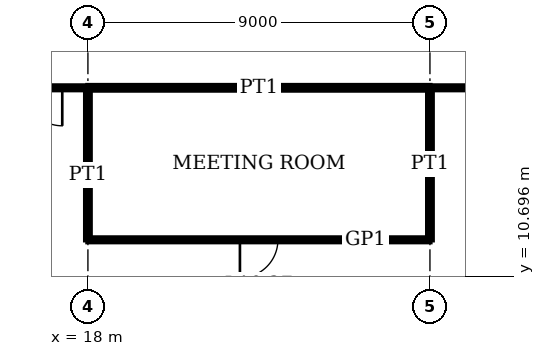
"""IFC4 building model, lengths in metres.
Left out: names, types, materials, properties, quantities, classifications, styles, units other than length and angle.
Written with IfcOpenShell. Run it as: python <this file> out.ifc"""

import sys

from ifc_helpers import new_model, si_unit, direction, frame, frame_2d, origin, place, context, subcontext, project, spatial, rectangle, extrude, element, fill, save


model = new_model("IFC4")
c1 = context("Model", 3, precision=1e-05, world=origin(), true_north=direction((0.0, 1.0)))
c2 = subcontext(c1, "Body", "Model", "MODEL_VIEW")
j1 = project(units=[si_unit("LENGTHUNIT", "METRE"), si_unit("PLANEANGLEUNIT", "RADIAN")], contexts=[c1])
p1 = place(None, origin())
s1 = spatial("IfcSite", under=j1, at=p1, CompositionType="ELEMENT")
p2 = place(p1, origin())
s2 = spatial("IfcBuilding", under=s1, at=p2, CompositionType="ELEMENT")
p3 = place(p2, frame((0.0, 0.0, 43.8)))
s3 = spatial("IfcBuildingStorey", under=s2, at=p3, CompositionType="ELEMENT", Elevation=43.8)
p4 = place(p3, frame((18.0, 11.65, 0.0), z_axis=(0.0, 0.0, 1.0), x_axis=(1.0, 0.0, 0.0)))
e1 = element("IfcWall", 1, at=p4, inside=s3, PredefinedType="PARTITIONING", context=c2, shape_type="SweptSolid", body=[
    extrude(rectangle(XDim=9.0, YDim=0.1, at=frame_2d((4.5, 0.0))), origin(), (0.0, 0.0, 1.0), 3.75),
])
p5 = place(p4, frame((4.0, 0.0, 0.0)))
e2 = element("IfcOpeningElement", 2, at=p5, cuts=e1, PredefinedType="OPENING", context=c2, shape_type="SweptSolid", body=[
    extrude(rectangle(XDim=1.0, YDim=2.4, at=frame_2d((0.5, 1.2))), frame((0.0, 0.06, 0.0), z_axis=(0.0, -1.0, 0.0), x_axis=(1.0, 0.0, 0.0)), (0.0, 0.0, 1.0), 0.12),
])
p6 = place(p3, frame((18.0, 15.65, 0.0), z_axis=(0.0, 0.0, 1.0), x_axis=(1.0, 0.0, 0.0)))
e3 = element("IfcWall", 3, at=p6, inside=s3, PredefinedType="PARTITIONING", context=c2, shape_type="SweptSolid", body=[
    extrude(rectangle(XDim=9.0, YDim=0.12, at=frame_2d((4.5, 0.0))), origin(), (0.0, 0.0, 1.0), 3.75),
])
p7 = place(p3, frame((15.65, 15.65, 0.0), z_axis=(0.0, 0.0, 1.0), x_axis=(1.0, 0.0, 0.0)))
e4 = element("IfcWall", 4, at=p7, inside=s3, PredefinedType="PARTITIONING", context=c2, shape_type="SweptSolid", body=[
    extrude(rectangle(XDim=2.35, YDim=0.1, at=frame_2d((1.175, 0.0))), origin(), (0.0, 0.0, 1.0), 3.75),
])
p8 = place(p7, frame((0.675, 0.0, 0.0)))
e5 = element("IfcOpeningElement", 5, at=p8, cuts=e4, PredefinedType="OPENING", context=c2, shape_type="SweptSolid", body=[
    extrude(rectangle(XDim=1.0, YDim=2.4, at=frame_2d((0.5, 1.2))), frame((0.0, 0.06, 0.0), z_axis=(0.0, -1.0, 0.0), x_axis=(1.0, 0.0, 0.0)), (0.0, 0.0, 1.0), 0.12),
])
p9 = place(p3, frame((27.0, 15.65, 0.0), z_axis=(0.0, 0.0, 1.0), x_axis=(1.0, 0.0, 0.0)))
e6 = element("IfcWall", 6, at=p9, inside=s3, PredefinedType="PARTITIONING", context=c2, shape_type="SweptSolid", body=[
    extrude(rectangle(XDim=20.35, YDim=0.1, at=frame_2d((10.175, 0.0))), origin(), (0.0, 0.0, 1.0), 3.75),
])
for number, where, z_axis, x_axis in (
    (7, (18.0, 11.65, 0.0), (0.0, 0.0, 1.0), (0.0, 1.0, 0.0)),
    (8, (27.0, 11.65, 0.0), (0.0, 0.0, 1.0), (0.0, 1.0, 0.0)),
):
    element("IfcWall", number, at=place(p3, frame(where, z_axis=z_axis, x_axis=x_axis)), inside=s3, PredefinedType="PARTITIONING", context=c2, shape_type="SweptSolid", body=[
        extrude(rectangle(XDim=4.0, YDim=0.12, at=frame_2d((2.0, 0.0))), origin(), (0.0, 0.0, 1.0), 3.05),
    ])
p10 = place(p5, origin())
e9 = element("IfcDoor", 9, at=p10, inside=s3, OperationType="SINGLE_SWING_LEFT", PredefinedType="DOOR", context=c2, shape_type="SweptSolid", body=[
    extrude(rectangle(XDim=1.0, YDim=2.4, at=frame_2d((0.5, 1.2))), frame((0.0, 0.02, 0.0), z_axis=(0.0, -1.0, 0.0), x_axis=(1.0, 0.0, 0.0)), (0.0, 0.0, 1.0), 0.04),
])
fill(e2, e9)
p11 = place(p8, origin())
e10 = element("IfcDoor", 10, at=p11, inside=s3, OperationType="SINGLE_SWING_RIGHT", PredefinedType="DOOR", context=c2, shape_type="SweptSolid", body=[
    extrude(rectangle(XDim=1.0, YDim=2.4, at=frame_2d((0.5, 1.2))), frame((0.0, 0.02, 0.0), z_axis=(0.0, -1.0, 0.0), x_axis=(1.0, 0.0, 0.0)), (0.0, 0.0, 1.0), 0.04),
])
fill(e5, e10)
save(model, sys.argv[1])
